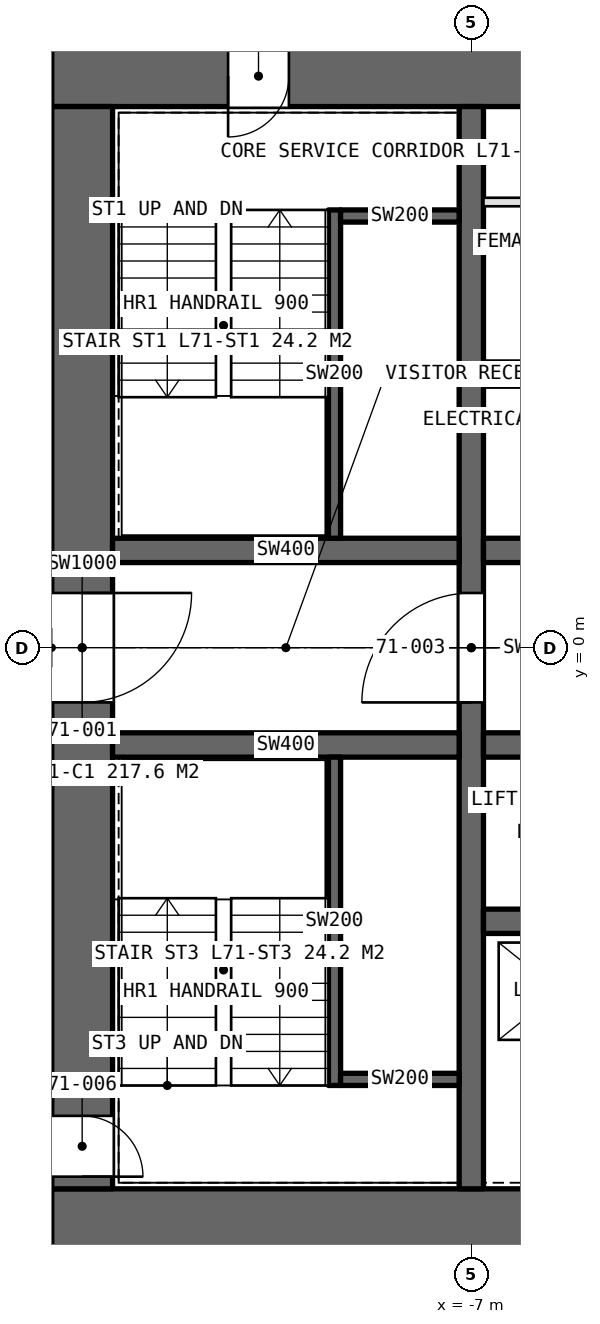
"""IFC4 building model, lengths in metres.
Left out: names, types, materials, properties, quantities, classifications, styles, units other than length and angle.
Written with IfcOpenShell. Run it as: python <this file> out.ifc"""

import sys

from ifc_helpers import new_model, si_unit, direction, frame, frame_2d, origin, place, context, subcontext, project, spatial, rectangle, extrude, element, fill, save


model = new_model("IFC4")
c1 = context("Model", 3, precision=1e-05, world=origin(), true_north=direction((0.0, 1.0)))
c2 = subcontext(c1, "Body", "Model", "MODEL_VIEW")
j1 = project(units=[si_unit("LENGTHUNIT", "METRE"), si_unit("PLANEANGLEUNIT", "RADIAN")], contexts=[c1])
p1 = place(None, origin())
s1 = spatial("IfcSite", under=j1, at=p1, CompositionType="ELEMENT")
p2 = place(p1, origin())
s2 = spatial("IfcBuilding", under=s1, at=p2, CompositionType="ELEMENT")
p3 = place(p2, frame((0.0, 0.0, 317.4)))
s3 = spatial("IfcBuildingStorey", under=s2, at=p3, CompositionType="ELEMENT", Elevation=317.4)
p4 = place(p3, frame((-13.9, -9.4, 0.0), z_axis=(0.0, 0.0, 1.0), x_axis=(1.0, 0.0, 0.0)))
e1 = element("IfcWall", 1, at=p4, inside=s3, PredefinedType="SHEAR", context=c2, shape_type="SweptSolid", body=[
    extrude(rectangle(XDim=27.8, YDim=1.0, at=frame_2d((13.9, 0.0))), origin(), (0.0, 0.0, 1.0), 4.2),
])
p5 = place(p4, frame((22.95, 0.0, 0.0)))
e2 = element("IfcOpeningElement", 2, at=p5, cuts=e1, PredefinedType="OPENING", context=c2, shape_type="SweptSolid", body=[
    extrude(rectangle(XDim=2.2, YDim=2.7, at=frame_2d((1.1, 1.35))), frame((0.0, 0.51, 0.0), z_axis=(0.0, -1.0, 0.0), x_axis=(1.0, 0.0, 0.0)), (0.0, 0.0, 1.0), 1.02),
])
p6 = place(p3, frame((13.9, 9.4, 0.0), z_axis=(0.0, 0.0, 1.0), x_axis=(-1.0, 0.0, 0.0)))
e3 = element("IfcWall", 3, at=p6, inside=s3, PredefinedType="SHEAR", context=c2, shape_type="SweptSolid", body=[
    extrude(rectangle(XDim=27.8, YDim=1.0, at=frame_2d((13.9, 0.0))), origin(), (0.0, 0.0, 1.0), 4.2),
])
p7 = place(p6, frame((23.9, 0.0, 0.0)))
e4 = element("IfcOpeningElement", 4, at=p7, cuts=e3, PredefinedType="OPENING", context=c2, shape_type="SweptSolid", body=[
    extrude(rectangle(XDim=1.0, YDim=2.4, at=frame_2d((0.5, 1.2))), frame((0.0, 0.51, 0.0), z_axis=(0.0, -1.0, 0.0), x_axis=(1.0, 0.0, 0.0)), (0.0, 0.0, 1.0), 1.02),
])
p8 = place(p6, frame((13.0, 0.0, 0.0)))
e5 = element("IfcOpeningElement", 5, at=p8, cuts=e3, PredefinedType="OPENING", context=c2, shape_type="SweptSolid", body=[
    extrude(rectangle(XDim=1.8, YDim=2.4, at=frame_2d((0.9, 1.2))), frame((0.0, 0.51, 0.0), z_axis=(0.0, -1.0, 0.0), x_axis=(1.0, 0.0, 0.0)), (0.0, 0.0, 1.0), 1.02),
])
p9 = place(p3, frame((-13.4, 8.9, 0.0), z_axis=(0.0, 0.0, 1.0), x_axis=(0.0, -1.0, 0.0)))
e6 = element("IfcWall", 6, at=p9, inside=s3, PredefinedType="SHEAR", context=c2, shape_type="SweptSolid", body=[
    extrude(rectangle(XDim=17.8, YDim=1.0, at=frame_2d((8.9, 0.0))), origin(), (0.0, 0.0, 1.0), 4.2),
])
p10 = place(p9, frame((8.0, 0.0, 0.0)))
e7 = element("IfcOpeningElement", 7, at=p10, cuts=e6, PredefinedType="OPENING", context=c2, shape_type="SweptSolid", body=[
    extrude(rectangle(XDim=1.8, YDim=2.4, at=frame_2d((0.9, 1.2))), frame((0.0, 0.51, 0.0), z_axis=(0.0, -1.0, 0.0), x_axis=(1.0, 0.0, 0.0)), (0.0, 0.0, 1.0), 1.02),
])
p11 = place(p9, frame((16.6, 0.0, 0.0)))
e8 = element("IfcOpeningElement", 8, at=p11, cuts=e6, PredefinedType="OPENING", context=c2, shape_type="SweptSolid", body=[
    extrude(rectangle(XDim=1.0, YDim=2.4, at=frame_2d((0.5, 1.2))), frame((0.0, 0.51, 0.0), z_axis=(0.0, -1.0, 0.0), x_axis=(1.0, 0.0, 0.0)), (0.0, 0.0, 1.0), 1.02),
])
p12 = place(p3, frame((-7.0, -8.9, 0.0), z_axis=(0.0, 0.0, 1.0), x_axis=(0.0, 1.0, 0.0)))
e9 = element("IfcWall", 9, at=p12, inside=s3, PredefinedType="SHEAR", context=c2, shape_type="SweptSolid", body=[
    extrude(rectangle(XDim=17.8, YDim=0.4, at=frame_2d((8.9, 0.0))), origin(), (0.0, 0.0, 1.0), 4.2),
])
p13 = place(p12, frame((8.0, 0.0, 0.0)))
e10 = element("IfcOpeningElement", 10, at=p13, cuts=e9, PredefinedType="OPENING", context=c2, shape_type="SweptSolid", body=[
    extrude(rectangle(XDim=1.8, YDim=2.4, at=frame_2d((0.9, 1.2))), frame((0.0, 0.21, 0.0), z_axis=(0.0, -1.0, 0.0), x_axis=(1.0, 0.0, 0.0)), (0.0, 0.0, 1.0), 0.42),
])
p14 = place(p3, frame((-6.8, 1.6, 0.0), z_axis=(0.0, 0.0, 1.0), x_axis=(1.0, 0.0, 0.0)))
e11 = element("IfcWall", 11, at=p14, inside=s3, PredefinedType="SHEAR", context=c2, shape_type="SweptSolid", body=[
    extrude(rectangle(XDim=13.6, YDim=0.4, at=frame_2d((6.8, 0.0))), origin(), (0.0, 0.0, 1.0), 4.2),
])
p15 = place(p14, frame((1.365, 0.0, 0.0)))
e12 = element("IfcOpeningElement", 12, at=p15, cuts=e11, PredefinedType="OPENING", context=c2, shape_type="SweptSolid", body=[
    extrude(rectangle(XDim=1.0, YDim=2.4, at=frame_2d((0.5, 1.2))), frame((0.0, 0.21, 0.0), z_axis=(0.0, -1.0, 0.0), x_axis=(1.0, 0.0, 0.0)), (0.0, 0.0, 1.0), 0.42),
])
p16 = place(p14, frame((5.1, 0.0, 0.0)))
e13 = element("IfcOpeningElement", 13, at=p16, cuts=e11, PredefinedType="OPENING", context=c2, shape_type="SweptSolid", body=[
    extrude(rectangle(XDim=1.0, YDim=2.4, at=frame_2d((0.5, 1.2))), frame((0.0, 0.21, 0.0), z_axis=(0.0, -1.0, 0.0), x_axis=(1.0, 0.0, 0.0)), (0.0, 0.0, 1.0), 0.42),
])
p17 = place(p14, frame((8.635, 0.0, 0.0)))
e14 = element("IfcOpeningElement", 14, at=p17, cuts=e11, PredefinedType="OPENING", context=c2, shape_type="SweptSolid", body=[
    extrude(rectangle(XDim=1.0, YDim=2.4, at=frame_2d((0.5, 1.2))), frame((0.0, 0.21, 0.0), z_axis=(0.0, -1.0, 0.0), x_axis=(1.0, 0.0, 0.0)), (0.0, 0.0, 1.0), 0.42),
])
p18 = place(p14, frame((11.9, 0.0, 0.0)))
e15 = element("IfcOpeningElement", 15, at=p18, cuts=e11, PredefinedType="OPENING", context=c2, shape_type="SweptSolid", body=[
    extrude(rectangle(XDim=1.0, YDim=2.4, at=frame_2d((0.5, 1.2))), frame((0.0, 0.21, 0.0), z_axis=(0.0, -1.0, 0.0), x_axis=(1.0, 0.0, 0.0)), (0.0, 0.0, 1.0), 0.42),
])
p19 = place(p3, frame((-6.8, -1.6, 0.0), z_axis=(0.0, 0.0, 1.0), x_axis=(1.0, 0.0, 0.0)))
e16 = element("IfcWall", 16, at=p19, inside=s3, PredefinedType="SHEAR", context=c2, shape_type="SweptSolid", body=[
    extrude(rectangle(XDim=13.6, YDim=0.4, at=frame_2d((6.8, 0.0))), origin(), (0.0, 0.0, 1.0), 4.2),
])
p20 = place(p19, frame((11.9, 0.0, 0.0)))
e17 = element("IfcOpeningElement", 17, at=p20, cuts=e16, PredefinedType="OPENING", context=c2, shape_type="SweptSolid", body=[
    extrude(rectangle(XDim=1.0, YDim=2.4, at=frame_2d((0.5, 1.2))), frame((0.0, 0.21, 0.0), z_axis=(0.0, -1.0, 0.0), x_axis=(1.0, 0.0, 0.0)), (0.0, 0.0, 1.0), 0.42),
])
p21 = place(p19, frame((4.5, 0.0, 0.0)))
e18 = element("IfcOpeningElement", 18, at=p21, cuts=e16, PredefinedType="OPENING", context=c2, shape_type="SweptSolid", body=[
    extrude(rectangle(XDim=1.8, YDim=2.4, at=frame_2d((0.9, 1.2))), frame((0.0, 0.21, 0.0), z_axis=(0.0, -1.0, 0.0), x_axis=(1.0, 0.0, 0.0)), (0.0, 0.0, 1.0), 0.42),
])
p22 = place(p3, frame((-6.8, 4.5, 0.0), z_axis=(0.0, 0.0, 1.0), x_axis=(1.0, 0.0, 0.0)))
e19 = element("IfcWall", 19, at=p22, inside=s3, PredefinedType="SHEAR", context=c2, shape_type="SweptSolid", body=[
    extrude(rectangle(XDim=13.6, YDim=0.4, at=frame_2d((6.8, 0.0))), origin(), (0.0, 0.0, 1.0), 4.2),
])
p23 = place(p3, frame((-6.8, -4.5, 0.0), z_axis=(0.0, 0.0, 1.0), x_axis=(1.0, 0.0, 0.0)))
e20 = element("IfcWall", 20, at=p23, inside=s3, PredefinedType="SHEAR", context=c2, shape_type="SweptSolid", body=[
    extrude(rectangle(XDim=13.6, YDim=0.4, at=frame_2d((6.8, 0.0))), origin(), (0.0, 0.0, 1.0), 4.2),
])
p24 = place(p23, frame((0.7, 0.0, 0.0)))
e21 = element("IfcOpeningElement", 21, at=p24, cuts=e20, PredefinedType="OPENING", context=c2, shape_type="SweptSolid", body=[
    extrude(rectangle(XDim=1.1, YDim=2.4, at=frame_2d((0.55, 1.2))), frame((0.0, 0.21, 0.0), z_axis=(0.0, -1.0, 0.0), x_axis=(1.0, 0.0, 0.0)), (0.0, 0.0, 1.0), 0.42),
])
p25 = place(p23, frame((3.5, 0.0, 0.0)))
e22 = element("IfcOpeningElement", 22, at=p25, cuts=e20, PredefinedType="OPENING", context=c2, shape_type="SweptSolid", body=[
    extrude(rectangle(XDim=1.1, YDim=2.4, at=frame_2d((0.55, 1.2))), frame((0.0, 0.21, 0.0), z_axis=(0.0, -1.0, 0.0), x_axis=(1.0, 0.0, 0.0)), (0.0, 0.0, 1.0), 0.42),
])
p26 = place(p23, frame((6.3, 0.0, 0.0)))
e23 = element("IfcOpeningElement", 23, at=p26, cuts=e20, PredefinedType="OPENING", context=c2, shape_type="SweptSolid", body=[
    extrude(rectangle(XDim=1.1, YDim=2.4, at=frame_2d((0.55, 1.2))), frame((0.0, 0.21, 0.0), z_axis=(0.0, -1.0, 0.0), x_axis=(1.0, 0.0, 0.0)), (0.0, 0.0, 1.0), 0.42),
])
p27 = place(p23, frame((9.1, 0.0, 0.0)))
e24 = element("IfcOpeningElement", 24, at=p27, cuts=e20, PredefinedType="OPENING", context=c2, shape_type="SweptSolid", body=[
    extrude(rectangle(XDim=1.1, YDim=2.4, at=frame_2d((0.55, 1.2))), frame((0.0, 0.21, 0.0), z_axis=(0.0, -1.0, 0.0), x_axis=(1.0, 0.0, 0.0)), (0.0, 0.0, 1.0), 0.42),
])
for number, where, z_axis, x_axis in (
    (25, (-12.9, 1.6, 0.0), (0.0, 0.0, 1.0), (1.0, 0.0, 0.0)),
    (26, (-12.9, -1.6, 0.0), (0.0, 0.0, 1.0), (1.0, 0.0, 0.0)),
):
    element("IfcWall", number, at=place(p3, frame(where, z_axis=z_axis, x_axis=x_axis)), inside=s3, PredefinedType="SHEAR", context=c2, shape_type="SweptSolid", body=[
        extrude(rectangle(XDim=5.7, YDim=0.4, at=frame_2d((2.85, 0.0))), origin(), (0.0, 0.0, 1.0), 4.2),
    ])
p28 = place(p3, frame((-6.8, 7.33, 0.0), z_axis=(0.0, 0.0, 1.0), x_axis=(1.0, 0.0, 0.0)))
e27 = element("IfcWall", 27, at=p28, inside=s3, PredefinedType="PARTITIONING", context=c2, shape_type="SweptSolid", body=[
    extrude(rectangle(XDim=13.6, YDim=0.14, at=frame_2d((6.8, 0.0))), origin(), (0.0, 0.0, 1.0), 3.95),
])
p29 = place(p28, frame((3.28, 0.0, 0.0)))
e28 = element("IfcOpeningElement", 28, at=p29, cuts=e27, PredefinedType="OPENING", context=c2, shape_type="SweptSolid", body=[
    extrude(rectangle(XDim=1.0, YDim=2.4, at=frame_2d((0.5, 1.2))), frame((0.0, 0.08, 0.0), z_axis=(0.0, -1.0, 0.0), x_axis=(1.0, 0.0, 0.0)), (0.0, 0.0, 1.0), 0.16),
])
p30 = place(p28, frame((8.08, 0.0, 0.0)))
e29 = element("IfcOpeningElement", 29, at=p30, cuts=e27, PredefinedType="OPENING", context=c2, shape_type="SweptSolid", body=[
    extrude(rectangle(XDim=1.0, YDim=2.4, at=frame_2d((0.5, 1.2))), frame((0.0, 0.08, 0.0), z_axis=(0.0, -1.0, 0.0), x_axis=(1.0, 0.0, 0.0)), (0.0, 0.0, 1.0), 0.16),
])
p31 = place(p28, frame((12.25, 0.0, 0.0)))
e30 = element("IfcOpeningElement", 30, at=p31, cuts=e27, PredefinedType="OPENING", context=c2, shape_type="SweptSolid", body=[
    extrude(rectangle(XDim=1.1, YDim=2.4, at=frame_2d((0.55, 1.2))), frame((0.0, 0.08, 0.0), z_axis=(0.0, -1.0, 0.0), x_axis=(1.0, 0.0, 0.0)), (0.0, 0.0, 1.0), 0.16),
])
p32 = place(p3, frame((-9.25, 7.2, 0.0), z_axis=(0.0, 0.0, 1.0), x_axis=(0.0, -1.0, 0.0)))
e31 = element("IfcWall", 31, at=p32, inside=s3, PredefinedType="SOLIDWALL", context=c2, shape_type="SweptSolid", body=[
    extrude(rectangle(XDim=5.4, YDim=0.2, at=frame_2d((2.7, 0.0))), origin(), (0.0, 0.0, 1.0), 4.2),
])
p33 = place(p3, frame((-9.15, 7.1, 0.0), z_axis=(0.0, 0.0, 1.0), x_axis=(1.0, 0.0, 0.0)))
e32 = element("IfcWall", 32, at=p33, inside=s3, PredefinedType="SOLIDWALL", context=c2, shape_type="SweptSolid", body=[
    extrude(rectangle(XDim=1.95, YDim=0.2, at=frame_2d((0.975, 0.0))), origin(), (0.0, 0.0, 1.0), 4.2),
])
p34 = place(p3, frame((-9.25, -7.2, 0.0), z_axis=(0.0, 0.0, 1.0), x_axis=(0.0, 1.0, 0.0)))
e33 = element("IfcWall", 33, at=p34, inside=s3, PredefinedType="SOLIDWALL", context=c2, shape_type="SweptSolid", body=[
    extrude(rectangle(XDim=5.4, YDim=0.2, at=frame_2d((2.7, 0.0))), origin(), (0.0, 0.0, 1.0), 4.2),
])
p35 = place(p3, frame((-9.15, -7.1, 0.0), z_axis=(0.0, 0.0, 1.0), x_axis=(1.0, 0.0, 0.0)))
e34 = element("IfcWall", 34, at=p35, inside=s3, PredefinedType="SOLIDWALL", context=c2, shape_type="SweptSolid", body=[
    extrude(rectangle(XDim=1.95, YDim=0.2, at=frame_2d((0.975, 0.0))), origin(), (0.0, 0.0, 1.0), 4.2),
])
p36 = place(p10, origin())
e35 = element("IfcDoor", 35, at=p36, inside=s3, OperationType="DOUBLE_DOOR_SINGLE_SWING", PredefinedType="DOOR", context=c2, shape_type="SweptSolid", body=[
    extrude(rectangle(XDim=1.8, YDim=2.4, at=frame_2d((0.9, 1.2))), frame((0.0, 0.025, 0.0), z_axis=(0.0, -1.0, 0.0), x_axis=(1.0, 0.0, 0.0)), (0.0, 0.0, 1.0), 0.05),
])
fill(e7, e35)
p37 = place(p13, origin())
e36 = element("IfcDoor", 36, at=p37, inside=s3, OperationType="DOUBLE_DOOR_SINGLE_SWING", PredefinedType="DOOR", context=c2, shape_type="SweptSolid", body=[
    extrude(rectangle(XDim=1.8, YDim=2.4, at=frame_2d((0.9, 1.2))), frame((0.0, 0.025, 0.0), z_axis=(0.0, -1.0, 0.0), x_axis=(1.0, 0.0, 0.0)), (0.0, 0.0, 1.0), 0.05),
])
fill(e10, e36)
p38 = place(p7, origin())
e37 = element("IfcDoor", 37, at=p38, inside=s3, OperationType="SINGLE_SWING_RIGHT", PredefinedType="DOOR", context=c2, shape_type="SweptSolid", body=[
    extrude(rectangle(XDim=1.0, YDim=2.4, at=frame_2d((0.5, 1.2))), frame((0.0, 0.025, 0.0), z_axis=(0.0, -1.0, 0.0), x_axis=(1.0, 0.0, 0.0)), (0.0, 0.0, 1.0), 0.05),
])
fill(e4, e37)
p39 = place(p11, origin())
e38 = element("IfcDoor", 38, at=p39, inside=s3, OperationType="SINGLE_SWING_RIGHT", PredefinedType="DOOR", context=c2, shape_type="SweptSolid", body=[
    extrude(rectangle(XDim=1.0, YDim=2.4, at=frame_2d((0.5, 1.2))), frame((0.0, 0.025, 0.0), z_axis=(0.0, -1.0, 0.0), x_axis=(1.0, 0.0, 0.0)), (0.0, 0.0, 1.0), 0.05),
])
fill(e8, e38)
save(model, sys.argv[1])
